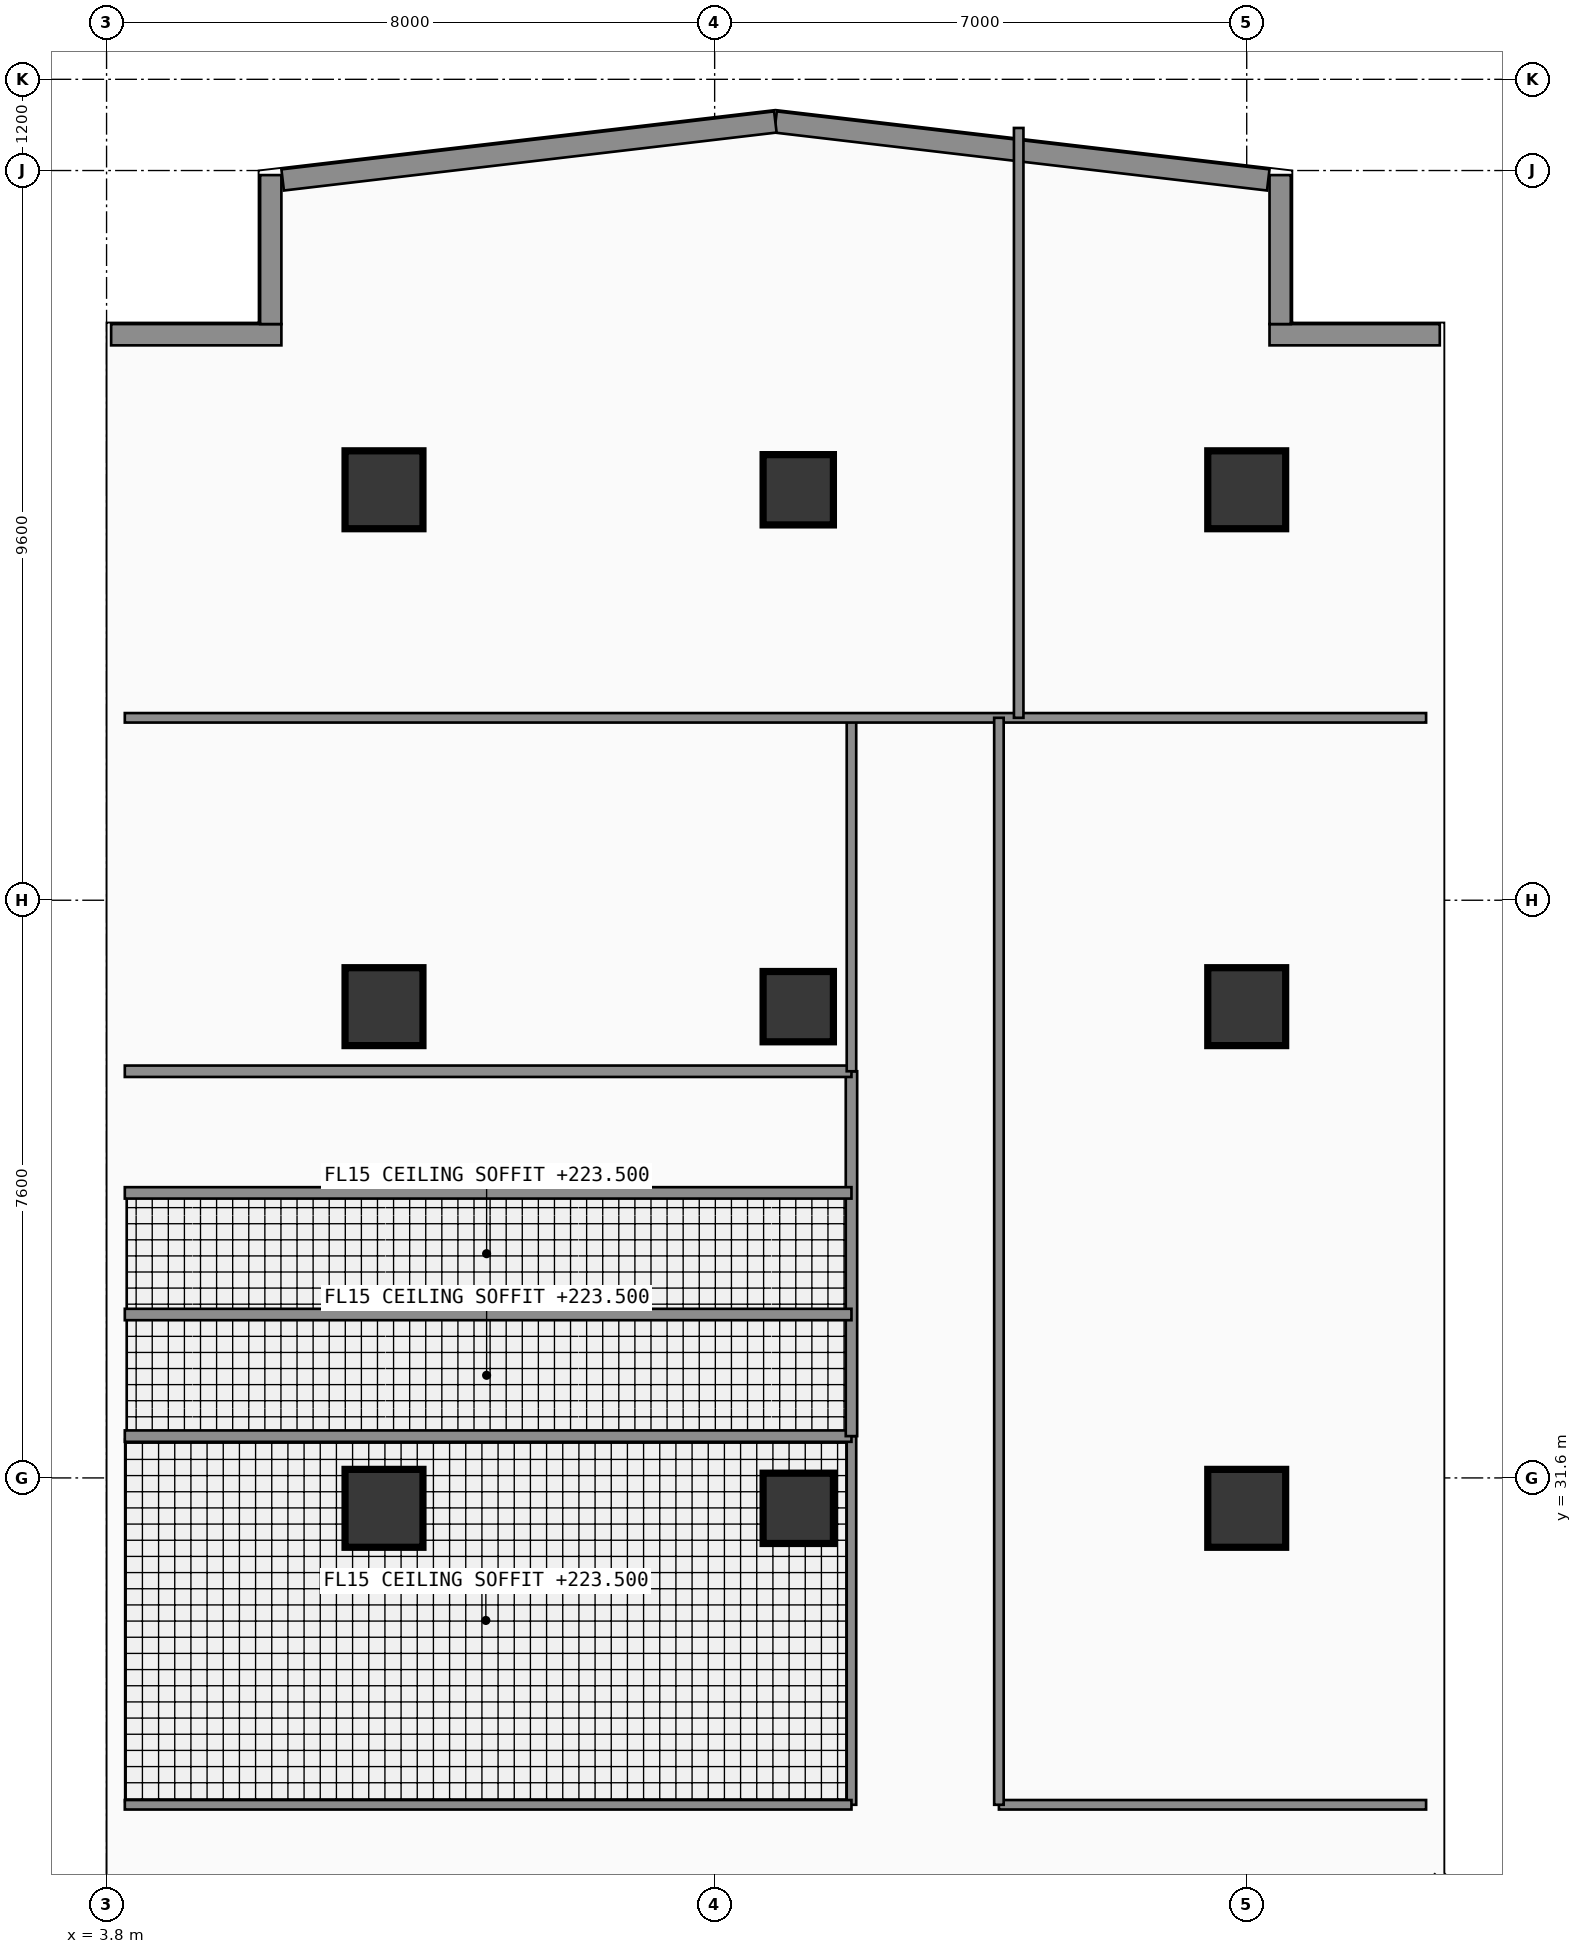
"""IFC4 building model, lengths in metres.
Left out: names, types, materials, properties, quantities, classifications, styles, units other than length and angle.
Written with IfcOpenShell. Run it as: python <this file> out.ifc"""

import sys

from ifc_helpers import new_model, si_unit, direction, frame, frame_2d, origin, origin_2d, place, context, subcontext, project, spatial, rectangle, extrude, element, fill, save


model = new_model("IFC4")
c1 = context("Model", 3, precision=1e-05, world=origin(), true_north=direction((0.0, 1.0)))
c2 = subcontext(c1, "Body", "Model", "MODEL_VIEW")
j1 = project(units=[si_unit("LENGTHUNIT", "METRE"), si_unit("PLANEANGLEUNIT", "RADIAN")], contexts=[c1])
p1 = place(None, origin())
s1 = spatial("IfcSite", under=j1, at=p1, CompositionType="ELEMENT")
p2 = place(p1, origin())
s2 = spatial("IfcBuilding", under=s1, at=p2, CompositionType="ELEMENT")
p3 = place(p2, frame((0.0, 0.0, 223.5)))
s3 = spatial("IfcBuildingStorey", under=s2, at=p3, CompositionType="ELEMENT", Elevation=223.5)
for number, where, z_axis, x_axis in (
    (1, (7.45, 31.2, 0.0), (0.0, 0.0, 1.0), (1.0, 0.0, 0.0)),
    (2, (7.45, 37.8, 0.0), (0.0, 0.0, 1.0), (1.0, 0.0, 0.0)),
    (3, (7.45, 44.6, 0.0), (0.0, 0.0, 1.0), (1.0, 0.0, 0.0)),
    (4, (18.8, 31.2, 0.0), (0.0, 0.0, 1.0), (1.0, 0.0, 0.0)),
    (5, (18.8, 37.8, 0.0), (0.0, 0.0, 1.0), (1.0, 0.0, 0.0)),
    (6, (18.8, 44.6, 0.0), (0.0, 0.0, 1.0), (1.0, 0.0, 0.0)),
):
    element("IfcColumn", number, at=place(p3, frame(where, z_axis=z_axis, x_axis=x_axis)), inside=s3, PredefinedType="COLUMN", context=c2, shape_type="SweptSolid", body=[
        extrude(rectangle(XDim=1.0, YDim=1.0, at=origin_2d()), origin(), (0.0, 0.0, 1.0), 3.56),
    ])
for number, where, z_axis, x_axis in (
    (7, (12.9, 31.2, 0.0), (0.0, 0.0, 1.0), (1.0, 0.0, 0.0)),
    (8, (12.9, 37.8, 0.0), (0.0, 0.0, 1.0), (1.0, 0.0, 0.0)),
    (9, (12.9, 44.6, 0.0), (0.0, 0.0, 1.0), (1.0, 0.0, 0.0)),
):
    element("IfcColumn", number, at=place(p3, frame(where, z_axis=z_axis, x_axis=x_axis)), inside=s3, PredefinedType="COLUMN", context=c2, shape_type="SweptSolid", body=[
        extrude(rectangle(XDim=0.9, YDim=0.9, at=origin_2d()), origin(), (0.0, 0.0, 1.0), 3.56),
    ])
p4 = place(p3, frame((19.1, 46.64, 0.0), z_axis=(0.0, 0.0, 1.0), x_axis=(1.0, 0.0, 0.0)))
e10 = element("IfcWall", 10, at=p4, inside=s3, PredefinedType="SOLIDWALL", context=c2, shape_type="SweptSolid", body=[
    extrude(rectangle(XDim=2.24, YDim=0.28, at=frame_2d((1.12, 0.0))), origin(), (0.0, 0.0, 1.0), 3.56),
])
p5 = place(p3, frame((19.24, 46.78, 0.0), z_axis=(0.0, 0.0, 1.0), x_axis=(0.0, 1.0, 0.0)))
e11 = element("IfcWall", 11, at=p5, inside=s3, PredefinedType="SOLIDWALL", context=c2, shape_type="SweptSolid", body=[
    extrude(rectangle(XDim=1.96, YDim=0.28, at=frame_2d((0.98, 0.0))), origin(), (0.0, 0.0, 1.0), 3.56),
])
p6 = place(p3, frame((3.86, 46.64, 0.0), z_axis=(0.0, 0.0, 1.0), x_axis=(1.0, 0.0, 0.0)))
e12 = element("IfcWall", 12, at=p6, inside=s3, PredefinedType="SOLIDWALL", context=c2, shape_type="SweptSolid", body=[
    extrude(rectangle(XDim=2.24, YDim=0.28, at=frame_2d((1.12, 0.0))), origin(), (0.0, 0.0, 1.0), 3.56),
])
p7 = place(p3, frame((5.96, 46.78, 0.0), z_axis=(0.0, 0.0, 1.0), x_axis=(0.0, 1.0, 0.0)))
e13 = element("IfcWall", 13, at=p7, inside=s3, PredefinedType="SOLIDWALL", context=c2, shape_type="SweptSolid", body=[
    extrude(rectangle(XDim=1.96, YDim=0.28, at=frame_2d((0.98, 0.0))), origin(), (0.0, 0.0, 1.0), 3.56),
])
p8 = place(p3, frame((27.685, 19.775, 0.0), z_axis=(0.0, 0.0, 1.0), x_axis=(-0.707106781187, 0.707106781187, 0.0)))
e14 = element("IfcWall", 14, at=p8, inside=s3, PredefinedType="SOLIDWALL", context=c2, shape_type="SweptSolid", body=[
    extrude(rectangle(XDim=9.207, YDim=0.28, at=frame_2d((4.603, 0.0))), origin(), (0.0, 0.0, 1.0), 3.56),
])
for number, where, z_axis, x_axis in (
    (15, (19.083, 48.676, 0.0), (0.0, 0.0, 1.0), (-0.993, 0.117, 0.0)),
    (16, (12.599, 49.439, 0.0), (0.0, 0.0, 1.0), (-0.993, -0.117, 0.0)),
):
    element("IfcWall", number, at=place(p3, frame(where, z_axis=z_axis, x_axis=x_axis)), inside=s3, PredefinedType="SOLIDWALL", context=c2, shape_type="SweptSolid", body=[
        extrude(rectangle(XDim=6.527, YDim=0.28, at=frame_2d((3.263, 0.0))), origin(), (0.0, 0.0, 1.0), 3.56),
    ])
p9 = place(p3, frame((13.6, 27.3, 0.0), z_axis=(0.0, 0.0, 1.0), x_axis=(0.0, 1.0, 0.0)))
e17 = element("IfcWall", 17, at=p9, inside=s3, PredefinedType="PARTITIONING", context=c2, shape_type="SweptSolid", body=[
    extrude(rectangle(XDim=4.85, YDim=0.125, at=frame_2d((2.425, 0.0))), origin(), (0.0, 0.0, 1.0), 3.56),
])
p10 = place(p9, frame((1.05, 0.0, 0.0)))
e18 = element("IfcOpeningElement", 18, at=p10, cuts=e17, PredefinedType="OPENING", context=c2, shape_type="SweptSolid", body=[
    extrude(rectangle(XDim=0.95, YDim=2.15, at=frame_2d((0.475, 1.075))), frame((0.0, 0.073, 0.0), z_axis=(0.0, -1.0, 0.0), x_axis=(1.0, 0.0, 0.0)), (0.0, 0.0, 1.0), 0.145),
])
p11 = place(p3, frame((4.04, 27.3, 0.0), z_axis=(0.0, 0.0, 1.0), x_axis=(1.0, 0.0, 0.0)))
e19 = element("IfcWall", 19, at=p11, inside=s3, PredefinedType="PARTITIONING", context=c2, shape_type="SweptSolid", body=[
    extrude(rectangle(XDim=9.56, YDim=0.125, at=frame_2d((4.78, 0.0))), origin(), (0.0, 0.0, 1.0), 3.56),
])
p12 = place(p3, frame((4.04, 32.15, 0.0), z_axis=(0.0, 0.0, 1.0), x_axis=(1.0, 0.0, 0.0)))
e20 = element("IfcWall", 20, at=p12, inside=s3, PredefinedType="PLUMBINGWALL", context=c2, shape_type="SweptSolid", body=[
    extrude(rectangle(XDim=9.56, YDim=0.15, at=frame_2d((4.78, 0.0))), origin(), (0.0, 0.0, 1.0), 3.56),
])
p13 = place(p3, frame((13.6, 32.15, 0.0), z_axis=(0.0, 0.0, 1.0), x_axis=(0.0, 1.0, 0.0)))
e21 = element("IfcWall", 21, at=p13, inside=s3, PredefinedType="PLUMBINGWALL", context=c2, shape_type="SweptSolid", body=[
    extrude(rectangle(XDim=4.8, YDim=0.15, at=frame_2d((2.4, 0.0))), origin(), (0.0, 0.0, 1.0), 3.56),
])
p14 = place(p13, frame((0.35, 0.0, 0.0)))
e22 = element("IfcOpeningElement", 22, at=p14, cuts=e21, PredefinedType="OPENING", context=c2, shape_type="SweptSolid", body=[
    extrude(rectangle(XDim=0.85, YDim=2.15, at=frame_2d((0.425, 1.075))), frame((0.0, 0.085, 0.0), z_axis=(0.0, -1.0, 0.0), x_axis=(1.0, 0.0, 0.0)), (0.0, 0.0, 1.0), 0.17),
])
p15 = place(p13, frame((1.95, 0.0, 0.0)))
e23 = element("IfcOpeningElement", 23, at=p15, cuts=e21, PredefinedType="OPENING", context=c2, shape_type="SweptSolid", body=[
    extrude(rectangle(XDim=0.85, YDim=2.15, at=frame_2d((0.425, 1.075))), frame((0.0, 0.085, 0.0), z_axis=(0.0, -1.0, 0.0), x_axis=(1.0, 0.0, 0.0)), (0.0, 0.0, 1.0), 0.17),
])
p16 = place(p13, frame((3.5, 0.0, 0.0)))
e24 = element("IfcOpeningElement", 24, at=p16, cuts=e21, PredefinedType="OPENING", context=c2, shape_type="SweptSolid", body=[
    extrude(rectangle(XDim=1.0, YDim=2.2, at=frame_2d((0.5, 1.1))), frame((0.0, 0.085, 0.0), z_axis=(0.0, -1.0, 0.0), x_axis=(1.0, 0.0, 0.0)), (0.0, 0.0, 1.0), 0.17),
])
for number, where, z_axis, x_axis in (
    (25, (4.04, 33.75, 0.0), (0.0, 0.0, 1.0), (1.0, 0.0, 0.0)),
    (26, (4.04, 35.35, 0.0), (0.0, 0.0, 1.0), (1.0, 0.0, 0.0)),
):
    element("IfcWall", number, at=place(p3, frame(where, z_axis=z_axis, x_axis=x_axis)), inside=s3, PredefinedType="PLUMBINGWALL", context=c2, shape_type="SweptSolid", body=[
        extrude(rectangle(XDim=9.56, YDim=0.15, at=frame_2d((4.78, 0.0))), origin(), (0.0, 0.0, 1.0), 3.2),
    ])
p17 = place(p3, frame((4.04, 36.95, 0.0), z_axis=(0.0, 0.0, 1.0), x_axis=(1.0, 0.0, 0.0)))
e27 = element("IfcWall", 27, at=p17, inside=s3, PredefinedType="PLUMBINGWALL", context=c2, shape_type="SweptSolid", body=[
    extrude(rectangle(XDim=9.56, YDim=0.15, at=frame_2d((4.78, 0.0))), origin(), (0.0, 0.0, 1.0), 3.56),
])
p18 = place(p3, frame((13.6, 36.95, 0.0), z_axis=(0.0, 0.0, 1.0), x_axis=(0.0, 1.0, 0.0)))
e28 = element("IfcWall", 28, at=p18, inside=s3, PredefinedType="PARTITIONING", context=c2, shape_type="SweptSolid", body=[
    extrude(rectangle(XDim=4.65, YDim=0.125, at=frame_2d((2.325, 0.0))), origin(), (0.0, 0.0, 1.0), 3.56),
])
p19 = place(p18, frame((1.85, 0.0, 0.0)))
e29 = element("IfcOpeningElement", 29, at=p19, cuts=e28, PredefinedType="OPENING", context=c2, shape_type="SweptSolid", body=[
    extrude(rectangle(XDim=0.95, YDim=2.15, at=frame_2d((0.475, 1.075))), frame((0.0, 0.073, 0.0), z_axis=(0.0, -1.0, 0.0), x_axis=(1.0, 0.0, 0.0)), (0.0, 0.0, 1.0), 0.145),
])
p20 = place(p3, frame((4.04, 41.6, 0.0), z_axis=(0.0, 0.0, 1.0), x_axis=(1.0, 0.0, 0.0)))
e30 = element("IfcWall", 30, at=p20, inside=s3, PredefinedType="PARTITIONING", context=c2, shape_type="SweptSolid", body=[
    extrude(rectangle(XDim=17.12, YDim=0.125, at=frame_2d((8.56, 0.0))), origin(), (0.0, 0.0, 1.0), 3.56),
])
p21 = place(p20, frame((9.96, 0.0, 0.0)))
e31 = element("IfcOpeningElement", 31, at=p21, cuts=e30, PredefinedType="OPENING", context=c2, shape_type="SweptSolid", body=[
    extrude(rectangle(XDim=1.0, YDim=2.2, at=frame_2d((0.5, 1.1))), frame((0.0, 0.073, 0.0), z_axis=(0.0, -1.0, 0.0), x_axis=(1.0, 0.0, 0.0)), (0.0, 0.0, 1.0), 0.145),
])
p22 = place(p3, frame((15.8, 41.6, 0.0), z_axis=(0.0, 0.0, 1.0), x_axis=(0.0, 1.0, 0.0)))
e32 = element("IfcWall", 32, at=p22, inside=s3, PredefinedType="PARTITIONING", context=c2, shape_type="SweptSolid", body=[
    extrude(rectangle(XDim=7.76, YDim=0.125, at=frame_2d((3.88, 0.0))), origin(), (0.0, 0.0, 1.0), 3.56),
])
p23 = place(p22, frame((3.47, 0.0, 0.0)))
e33 = element("IfcOpeningElement", 33, at=p23, cuts=e32, PredefinedType="OPENING", context=c2, shape_type="SweptSolid", body=[
    extrude(rectangle(XDim=0.95, YDim=2.15, at=frame_2d((0.475, 1.075))), frame((0.0, 0.073, 0.0), z_axis=(0.0, -1.0, 0.0), x_axis=(1.0, 0.0, 0.0)), (0.0, 0.0, 1.0), 0.145),
])
p24 = place(p3, frame((15.54, 27.3, 0.0), z_axis=(0.0, 0.0, 1.0), x_axis=(1.0, 0.0, 0.0)))
e34 = element("IfcWall", 34, at=p24, inside=s3, PredefinedType="PARTITIONING", context=c2, shape_type="SweptSolid", body=[
    extrude(rectangle(XDim=5.62, YDim=0.125, at=frame_2d((2.81, 0.0))), origin(), (0.0, 0.0, 1.0), 3.56),
])
p25 = place(p3, frame((15.54, 27.3, 0.0), z_axis=(0.0, 0.0, 1.0), x_axis=(0.0, 1.0, 0.0)))
e35 = element("IfcWall", 35, at=p25, inside=s3, PredefinedType="PARTITIONING", context=c2, shape_type="SweptSolid", body=[
    extrude(rectangle(XDim=14.3, YDim=0.125, at=frame_2d((7.15, 0.0))), origin(), (0.0, 0.0, 1.0), 3.56),
])
p26 = place(p25, frame((6.746, 0.0, 0.0)))
e36 = element("IfcOpeningElement", 36, at=p26, cuts=e35, PredefinedType="OPENING", context=c2, shape_type="SweptSolid", body=[
    extrude(rectangle(XDim=0.95, YDim=2.15, at=frame_2d((0.475, 1.075))), frame((0.0, 0.073, 0.0), z_axis=(0.0, -1.0, 0.0), x_axis=(1.0, 0.0, 0.0)), (0.0, 0.0, 1.0), 0.145),
])
p27 = place(p10, origin())
e37 = element("IfcDoor", 37, at=p27, inside=s3, OperationType="SINGLE_SWING_RIGHT", PredefinedType="DOOR", context=c2, shape_type="SweptSolid", body=[
    extrude(rectangle(XDim=0.95, YDim=2.15, at=frame_2d((0.475, 1.075))), frame((0.0, 0.025, 0.0), z_axis=(0.0, -1.0, 0.0), x_axis=(1.0, 0.0, 0.0)), (0.0, 0.0, 1.0), 0.05),
])
fill(e18, e37)
p28 = place(p14, origin())
e38 = element("IfcDoor", 38, at=p28, inside=s3, OperationType="SINGLE_SWING_LEFT", PredefinedType="DOOR", context=c2, shape_type="SweptSolid", body=[
    extrude(rectangle(XDim=0.85, YDim=2.15, at=frame_2d((0.425, 1.075))), frame((0.0, 0.025, 0.0), z_axis=(0.0, -1.0, 0.0), x_axis=(1.0, 0.0, 0.0)), (0.0, 0.0, 1.0), 0.05),
])
fill(e22, e38)
p29 = place(p15, origin())
e39 = element("IfcDoor", 39, at=p29, inside=s3, OperationType="SINGLE_SWING_RIGHT", PredefinedType="DOOR", context=c2, shape_type="SweptSolid", body=[
    extrude(rectangle(XDim=0.85, YDim=2.15, at=frame_2d((0.425, 1.075))), frame((0.0, 0.025, 0.0), z_axis=(0.0, -1.0, 0.0), x_axis=(1.0, 0.0, 0.0)), (0.0, 0.0, 1.0), 0.05),
])
fill(e23, e39)
p30 = place(p16, origin())
e40 = element("IfcDoor", 40, at=p30, inside=s3, OperationType="SINGLE_SWING_LEFT", PredefinedType="DOOR", context=c2, shape_type="SweptSolid", body=[
    extrude(rectangle(XDim=1.0, YDim=2.2, at=frame_2d((0.5, 1.1))), frame((0.0, 0.025, 0.0), z_axis=(0.0, -1.0, 0.0), x_axis=(1.0, 0.0, 0.0)), (0.0, 0.0, 1.0), 0.05),
])
fill(e24, e40)
p31 = place(p19, origin())
e41 = element("IfcDoor", 41, at=p31, inside=s3, OperationType="SINGLE_SWING_RIGHT", PredefinedType="DOOR", context=c2, shape_type="SweptSolid", body=[
    extrude(rectangle(XDim=0.95, YDim=2.15, at=frame_2d((0.475, 1.075))), frame((0.0, 0.025, 0.0), z_axis=(0.0, -1.0, 0.0), x_axis=(1.0, 0.0, 0.0)), (0.0, 0.0, 1.0), 0.05),
])
fill(e29, e41)
p32 = place(p21, origin())
e42 = element("IfcDoor", 42, at=p32, inside=s3, OperationType="SINGLE_SWING_LEFT", PredefinedType="DOOR", context=c2, shape_type="SweptSolid", body=[
    extrude(rectangle(XDim=1.0, YDim=2.2, at=frame_2d((0.5, 1.1))), frame((0.0, 0.025, 0.0), z_axis=(0.0, -1.0, 0.0), x_axis=(1.0, 0.0, 0.0)), (0.0, 0.0, 1.0), 0.05),
])
fill(e31, e42)
p33 = place(p23, origin())
e43 = element("IfcDoor", 43, at=p33, inside=s3, OperationType="SINGLE_SWING_RIGHT", PredefinedType="DOOR", context=c2, shape_type="SweptSolid", body=[
    extrude(rectangle(XDim=0.95, YDim=2.15, at=frame_2d((0.475, 1.075))), frame((0.0, 0.025, 0.0), z_axis=(0.0, -1.0, 0.0), x_axis=(1.0, 0.0, 0.0)), (0.0, 0.0, 1.0), 0.05),
])
fill(e33, e43)
p34 = place(p26, origin())
e44 = element("IfcDoor", 44, at=p34, inside=s3, OperationType="SINGLE_SWING_LEFT", PredefinedType="DOOR", context=c2, shape_type="SweptSolid", body=[
    extrude(rectangle(XDim=0.95, YDim=2.15, at=frame_2d((0.475, 1.075))), frame((0.0, 0.025, 0.0), z_axis=(0.0, -1.0, 0.0), x_axis=(1.0, 0.0, 0.0)), (0.0, 0.0, 1.0), 0.05),
])
fill(e36, e44)
save(model, sys.argv[1])
